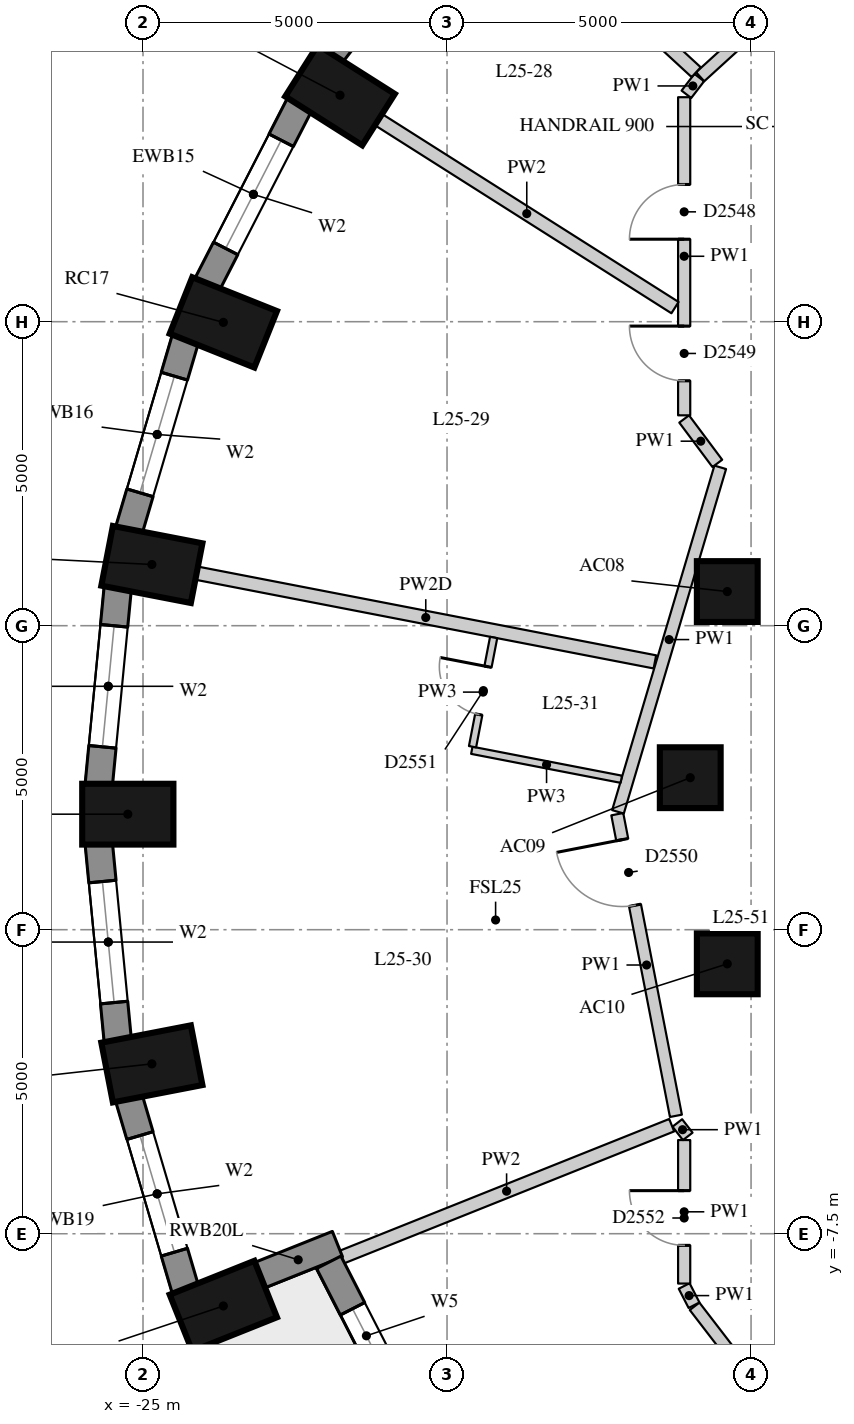
"""IFC4 building model, lengths in metres.
Left out: names, types, materials, properties, quantities, classifications, styles, units other than length and angle.
Written with IfcOpenShell. Run it as: python <this file> out.ifc"""

import sys

from ifc_helpers import new_model, si_unit, direction, frame, frame_2d, origin, origin_2d, place, context, subcontext, project, spatial, rectangle, extrude, element, fill, save


model = new_model("IFC4")
c1 = context("Model", 3, precision=1e-05, world=origin(), true_north=direction((0.0, 1.0)))
c2 = subcontext(c1, "Body", "Model", "MODEL_VIEW")
j1 = project(units=[si_unit("LENGTHUNIT", "METRE"), si_unit("PLANEANGLEUNIT", "RADIAN")], contexts=[c1])
p1 = place(None, origin())
s1 = spatial("IfcSite", under=j1, at=p1, CompositionType="ELEMENT")
p2 = place(p1, origin())
s2 = spatial("IfcBuilding", under=s1, at=p2, CompositionType="ELEMENT")
p3 = place(p2, frame((0.0, 0.0, 92.2)))
s3 = spatial("IfcBuildingStorey", under=s2, at=p3, CompositionType="ELEMENT", Elevation=92.2)
for number, where, z_axis, x_axis in (
    (1, (-21.76, 11.225, 0.0), (0.0, 0.0, 1.0), (-0.845, 0.536, 0.0)),
    (2, (-23.679, 7.489, 0.0), (0.0, 0.0, 1.0), (-0.929, 0.371, 0.0)),
    (3, (-24.854, 3.507, 0.0), (0.0, 0.0, 1.0), (-0.982, 0.19, 0.0)),
    (4, (-25.25, -0.6, 0.0), (0.0, 0.0, 1.0), (-1.0, 0.0, 0.0)),
    (5, (-24.854, -4.707, 0.0), (0.0, 0.0, 1.0), (-0.982, -0.19, 0.0)),
    (6, (-23.679, -8.689, 0.0), (0.0, 0.0, 1.0), (-0.929, -0.371, 0.0)),
):
    element("IfcColumn", number, at=place(p3, frame(where, z_axis=z_axis, x_axis=x_axis)), inside=s3, PredefinedType="COLUMN", context=c2, shape_type="SweptSolid", body=[
        extrude(rectangle(XDim=1.5, YDim=1.0, at=origin_2d()), origin(), (0.0, 0.0, 1.0), 3.3),
    ])
for number, where, z_axis, x_axis in (
    (7, (-15.391, 3.062, 0.0), (0.0, 0.0, 1.0), (1.0, 0.0, 0.0)),
    (8, (-16.0, 0.0, 0.0), (0.0, 0.0, 1.0), (1.0, 0.0, 0.0)),
    (9, (-15.391, -3.062, 0.0), (0.0, 0.0, 1.0), (1.0, 0.0, 0.0)),
):
    element("IfcColumn", number, at=place(p3, frame(where, z_axis=z_axis, x_axis=x_axis)), inside=s3, PredefinedType="COLUMN", context=c2, shape_type="SweptSolid", body=[
        extrude(rectangle(XDim=1.0, YDim=1.0, at=origin_2d()), origin(), (0.0, 0.0, 1.0), 3.3),
    ])
p4 = place(p3, frame((-19.835, 14.575, 0.0), z_axis=(0.0, 0.0, 1.0), x_axis=(-0.610693945156, -0.791866721961, 0.0)))
e10 = element("IfcWall", 10, at=p4, inside=s3, PredefinedType="SOLIDWALL", context=c2, shape_type="SweptSolid", body=[
    extrude(rectangle(XDim=3.395, YDim=0.45, at=frame_2d((1.697, 0.0))), origin(), (0.0, 0.0, 1.0), 3.02),
])
p5 = place(p4, frame((0.697, 0.0, 0.4)))
e11 = element("IfcOpeningElement", 11, at=p5, cuts=e10, PredefinedType="OPENING", context=c2, shape_type="SweptSolid", body=[
    extrude(rectangle(XDim=2.0, YDim=1.75, at=frame_2d((1.0, 0.875))), frame((0.0, 0.235, 0.0), z_axis=(0.0, -1.0, 0.0), x_axis=(1.0, 0.0, 0.0)), (0.0, 0.0, 1.0), 0.47),
])
p6 = place(p3, frame((-22.423, 11.077, 0.0), z_axis=(0.0, 0.0, 1.0), x_axis=(-0.456828186229, -0.889554949549, 0.0)))
e12 = element("IfcWall", 12, at=p6, inside=s3, PredefinedType="SOLIDWALL", context=c2, shape_type="SweptSolid", body=[
    extrude(rectangle(XDim=3.333, YDim=0.45, at=frame_2d((1.667, 0.0))), origin(), (0.0, 0.0, 1.0), 3.02),
])
p7 = place(p6, frame((0.666, 0.0, 0.4)))
e13 = element("IfcOpeningElement", 13, at=p7, cuts=e12, PredefinedType="OPENING", context=c2, shape_type="SweptSolid", body=[
    extrude(rectangle(XDim=2.0, YDim=1.75, at=frame_2d((1.0, 0.875))), frame((0.0, 0.235, 0.0), z_axis=(0.0, -1.0, 0.0), x_axis=(1.0, 0.0, 0.0)), (0.0, 0.0, 1.0), 0.47),
])
p8 = place(p3, frame((-24.302, 7.221, 0.0), z_axis=(0.0, 0.0, 1.0), x_axis=(-0.283071248438, -0.959098883488, 0.0)))
e14 = element("IfcWall", 14, at=p8, inside=s3, PredefinedType="SOLIDWALL", context=c2, shape_type="SweptSolid", body=[
    extrude(rectangle(XDim=3.286, YDim=0.45, at=frame_2d((1.643, 0.0))), origin(), (0.0, 0.0, 1.0), 3.02),
])
p9 = place(p8, frame((0.643, 0.0, 0.4)))
e15 = element("IfcOpeningElement", 15, at=p9, cuts=e14, PredefinedType="OPENING", context=c2, shape_type="SweptSolid", body=[
    extrude(rectangle(XDim=2.0, YDim=1.75, at=frame_2d((1.0, 0.875))), frame((0.0, 0.235, 0.0), z_axis=(0.0, -1.0, 0.0), x_axis=(1.0, 0.0, 0.0)), (0.0, 0.0, 1.0), 0.47),
])
p10 = place(p3, frame((-25.415, 3.126, 0.0), z_axis=(0.0, 0.0, 1.0), x_axis=(-0.095967726544, -0.995384446062, 0.0)))
e16 = element("IfcWall", 16, at=p10, inside=s3, PredefinedType="SOLIDWALL", context=c2, shape_type="SweptSolid", body=[
    extrude(rectangle(XDim=3.261, YDim=0.45, at=frame_2d((1.631, 0.0))), origin(), (0.0, 0.0, 1.0), 3.02),
])
p11 = place(p10, frame((0.631, 0.0, 0.4)))
e17 = element("IfcOpeningElement", 17, at=p11, cuts=e16, PredefinedType="OPENING", context=c2, shape_type="SweptSolid", body=[
    extrude(rectangle(XDim=2.0, YDim=1.75, at=frame_2d((1.0, 0.875))), frame((0.0, 0.235, 0.0), z_axis=(0.0, -1.0, 0.0), x_axis=(1.0, 0.0, 0.0)), (0.0, 0.0, 1.0), 0.47),
])
p12 = place(p3, frame((-25.728, -1.08, 0.0), z_axis=(0.0, 0.0, 1.0), x_axis=(0.095967726544, -0.995384446062, 0.0)))
e18 = element("IfcWall", 18, at=p12, inside=s3, PredefinedType="SOLIDWALL", context=c2, shape_type="SweptSolid", body=[
    extrude(rectangle(XDim=3.261, YDim=0.45, at=frame_2d((1.631, 0.0))), origin(), (0.0, 0.0, 1.0), 3.02),
])
p13 = place(p12, frame((0.631, 0.0, 0.4)))
e19 = element("IfcOpeningElement", 19, at=p13, cuts=e18, PredefinedType="OPENING", context=c2, shape_type="SweptSolid", body=[
    extrude(rectangle(XDim=2.0, YDim=1.75, at=frame_2d((1.0, 0.875))), frame((0.0, 0.235, 0.0), z_axis=(0.0, -1.0, 0.0), x_axis=(1.0, 0.0, 0.0)), (0.0, 0.0, 1.0), 0.47),
])
p14 = place(p3, frame((-25.232, -5.269, 0.0), z_axis=(0.0, 0.0, 1.0), x_axis=(0.283051078697, -0.959104836214, 0.0)))
e20 = element("IfcWall", 20, at=p14, inside=s3, PredefinedType="SOLIDWALL", context=c2, shape_type="SweptSolid", body=[
    extrude(rectangle(XDim=3.286, YDim=0.45, at=frame_2d((1.643, 0.0))), origin(), (0.0, 0.0, 1.0), 3.02),
])
p15 = place(p14, frame((0.643, 0.0, 0.4)))
e21 = element("IfcOpeningElement", 21, at=p15, cuts=e20, PredefinedType="OPENING", context=c2, shape_type="SweptSolid", body=[
    extrude(rectangle(XDim=2.0, YDim=1.75, at=frame_2d((1.0, 0.875))), frame((0.0, 0.235, 0.0), z_axis=(0.0, -1.0, 0.0), x_axis=(1.0, 0.0, 0.0)), (0.0, 0.0, 1.0), 0.47),
])
p16 = place(p3, frame((-23.093, -8.187, 0.0), z_axis=(0.0, 0.0, 1.0), x_axis=(0.928549333349, 0.371209018665, 0.0)))
e22 = element("IfcWall", 22, at=p16, inside=s3, PredefinedType="SOLIDWALL", context=c2, shape_type="SweptSolid", body=[
    extrude(rectangle(XDim=1.39, YDim=0.45, at=frame_2d((0.695, 0.0))), origin(), (0.0, 0.0, 1.0), 3.02),
])
p17 = place(p3, frame((-21.945, -7.97, 0.0), z_axis=(0.0, 0.0, 1.0), x_axis=(0.455905146579, -0.89002836883, 0.0)))
e23 = element("IfcWall", 23, at=p17, inside=s3, PredefinedType="SOLIDWALL", context=c2, shape_type="SweptSolid", body=[
    extrude(rectangle(XDim=3.867, YDim=0.45, at=frame_2d((1.934, 0.0))), origin(), (0.0, 0.0, 1.0), 3.02),
])
p18 = place(p17, frame((0.858, 0.0, 0.4)))
e24 = element("IfcOpeningElement", 24, at=p18, cuts=e23, PredefinedType="OPENING", context=c2, shape_type="SweptSolid", body=[
    extrude(rectangle(XDim=1.0, YDim=1.75, at=frame_2d((0.5, 0.875))), frame((0.0, 0.235, 0.0), z_axis=(0.0, -1.0, 0.0), x_axis=(1.0, 0.0, 0.0)), (0.0, 0.0, 1.0), 0.47),
])
p19 = place(p17, frame((2.009, 0.0, 0.0)))
e25 = element("IfcOpeningElement", 25, at=p19, cuts=e23, PredefinedType="OPENING", context=c2, shape_type="SweptSolid", body=[
    extrude(rectangle(XDim=1.0, YDim=2.15, at=frame_2d((0.5, 1.075))), frame((0.0, 0.235, 0.0), z_axis=(0.0, -1.0, 0.0), x_axis=(1.0, 0.0, 0.0)), (0.0, 0.0, 1.0), 0.47),
])
p20 = place(p3, frame((-14.573, -10.456, 0.0), z_axis=(0.0, 0.0, 1.0), x_axis=(-0.60967360535, 0.792652568872, 0.0)))
e26 = element("IfcWall", 26, at=p20, inside=s3, PredefinedType="PARTITIONING", context=c2, shape_type="SweptSolid", body=[
    extrude(rectangle(XDim=2.223, YDim=0.2, at=frame_2d((1.111, 0.0))), origin(), (0.0, 0.0, 1.0), 3.02),
])
p21 = place(p3, frame((-15.938, -8.676, 0.0), z_axis=(0.0, 0.0, 1.0), x_axis=(-0.456525695549, 0.889710227717, 0.0)))
e27 = element("IfcWall", 27, at=p21, inside=s3, PredefinedType="PARTITIONING", context=c2, shape_type="SweptSolid", body=[
    extrude(rectangle(XDim=0.356, YDim=0.2, at=frame_2d((0.178, 0.0))), origin(), (0.0, 0.0, 1.0), 3.02),
])
p22 = place(p3, frame((-16.1, -8.32, 0.0), z_axis=(0.0, 0.0, 1.0), x_axis=(0.0, 1.0, 0.0)))
e28 = element("IfcWall", 28, at=p22, inside=s3, PredefinedType="PARTITIONING", context=c2, shape_type="SweptSolid", body=[
    extrude(rectangle(XDim=2.36, YDim=0.2, at=frame_2d((1.18, 0.0))), origin(), (0.0, 0.0, 1.0), 3.02),
])
p23 = place(p22, frame((0.628, 0.0, 0.0)))
e29 = element("IfcOpeningElement", 29, at=p23, cuts=e28, PredefinedType="OPENING", context=c2, shape_type="SweptSolid", body=[
    extrude(rectangle(XDim=0.9, YDim=2.1, at=frame_2d((0.45, 1.05))), frame((0.0, 0.11, 0.0), z_axis=(0.0, -1.0, 0.0), x_axis=(1.0, 0.0, 0.0)), (0.0, 0.0, 1.0), 0.22),
])
p24 = place(p3, frame((-16.041, -5.9, 0.0), z_axis=(0.0, 0.0, 1.0), x_axis=(-0.612489897904, 0.790478415243, 0.0)))
e30 = element("IfcWall", 30, at=p24, inside=s3, PredefinedType="PARTITIONING", context=c2, shape_type="SweptSolid", body=[
    extrude(rectangle(XDim=0.28, YDim=0.2, at=frame_2d((0.14, 0.0))), origin(), (0.0, 0.0, 1.0), 3.02),
])
p25 = place(p3, frame((-16.236, -5.562, 0.0), z_axis=(0.0, 0.0, 1.0), x_axis=(-0.190753296708, 0.981638008532, 0.0)))
e31 = element("IfcWall", 31, at=p25, inside=s3, PredefinedType="PARTITIONING", context=c2, shape_type="SweptSolid", body=[
    extrude(rectangle(XDim=5.054, YDim=0.2, at=frame_2d((2.527, 0.0))), origin(), (0.0, 0.0, 1.0), 3.02),
])
p26 = place(p25, frame((3.528, 0.0, 0.0)))
e32 = element("IfcOpeningElement", 32, at=p26, cuts=e31, PredefinedType="OPENING", context=c2, shape_type="SweptSolid", body=[
    extrude(rectangle(XDim=1.1, YDim=2.1, at=frame_2d((0.55, 1.05))), frame((0.0, 0.11, 0.0), z_axis=(0.0, -1.0, 0.0), x_axis=(1.0, 0.0, 0.0)), (0.0, 0.0, 1.0), 0.22),
])
p27 = place(p3, frame((-17.189, -0.562, 0.0), z_axis=(0.0, 0.0, 1.0), x_axis=(0.28454253649, 0.95866341587, 0.0)))
e33 = element("IfcWall", 33, at=p27, inside=s3, PredefinedType="PARTITIONING", context=c2, shape_type="SweptSolid", body=[
    extrude(rectangle(XDim=5.911, YDim=0.2, at=frame_2d((2.956, 0.0))), origin(), (0.0, 0.0, 1.0), 3.02),
])
p28 = place(p3, frame((-15.555, 5.169, 0.0), z_axis=(0.0, 0.0, 1.0), x_axis=(-0.598284647233, 0.801283645712, 0.0)))
e34 = element("IfcWall", 34, at=p28, inside=s3, PredefinedType="PARTITIONING", context=c2, shape_type="SweptSolid", body=[
    extrude(rectangle(XDim=0.912, YDim=0.2, at=frame_2d((0.456, 0.0))), origin(), (0.0, 0.0, 1.0), 3.02),
])
p29 = place(p3, frame((-16.1, 5.96, 0.0), z_axis=(0.0, 0.0, 1.0), x_axis=(0.0, 1.0, 0.0)))
e35 = element("IfcWall", 35, at=p29, inside=s3, PredefinedType="PARTITIONING", context=c2, shape_type="SweptSolid", body=[
    extrude(rectangle(XDim=5.232, YDim=0.2, at=frame_2d((2.616, 0.0))), origin(), (0.0, 0.0, 1.0), 3.02),
])
p30 = place(p29, frame((2.897, 0.0, 0.0)))
e36 = element("IfcOpeningElement", 36, at=p30, cuts=e35, PredefinedType="OPENING", context=c2, shape_type="SweptSolid", body=[
    extrude(rectangle(XDim=0.9, YDim=2.1, at=frame_2d((0.45, 1.05))), frame((0.0, 0.11, 0.0), z_axis=(0.0, -1.0, 0.0), x_axis=(1.0, 0.0, 0.0)), (0.0, 0.0, 1.0), 0.22),
])
p31 = place(p29, frame((0.568, 0.0, 0.0)))
e37 = element("IfcOpeningElement", 37, at=p31, cuts=e35, PredefinedType="OPENING", context=c2, shape_type="SweptSolid", body=[
    extrude(rectangle(XDim=0.9, YDim=2.1, at=frame_2d((0.45, 1.05))), frame((0.0, 0.11, 0.0), z_axis=(0.0, -1.0, 0.0), x_axis=(1.0, 0.0, 0.0)), (0.0, 0.0, 1.0), 0.22),
])
p32 = place(p3, frame((-16.063, 11.24, 0.0), z_axis=(0.0, 0.0, 1.0), x_axis=(0.609744747854, 0.792597844096, 0.0)))
e38 = element("IfcWall", 38, at=p32, inside=s3, PredefinedType="PARTITIONING", context=c2, shape_type="SweptSolid", body=[
    extrude(rectangle(XDim=0.347, YDim=0.2, at=frame_2d((0.174, 0.0))), origin(), (0.0, 0.0, 1.0), 3.02),
])
p33 = place(p3, frame((-15.837, 11.528, 0.0), z_axis=(0.0, 0.0, 1.0), x_axis=(0.739402681643, 0.673263450946, 0.0)))
e39 = element("IfcWall", 39, at=p33, inside=s3, PredefinedType="PARTITIONING", context=c2, shape_type="SweptSolid", body=[
    extrude(rectangle(XDim=1.728, YDim=0.2, at=frame_2d((0.864, 0.0))), origin(), (0.0, 0.0, 1.0), 3.02),
])
p34 = place(p3, frame((-18.604, 14.094, 0.0), z_axis=(0.0, 0.0, 1.0), x_axis=(0.73529495628, -0.677747244383, 0.0)))
e40 = element("IfcWall", 40, at=p34, inside=s3, PredefinedType="PARTITIONING", context=c2, shape_type="SweptSolid", body=[
    extrude(rectangle(XDim=3.674, YDim=0.22, at=frame_2d((1.837, 0.0))), origin(), (0.0, 0.0, 1.0), 3.02),
])
p35 = place(p3, frame((-21.126, 10.823, 0.0), z_axis=(0.0, 0.0, 1.0), x_axis=(0.844518840625, -0.535525842355, 0.0)))
e41 = element("IfcWall", 41, at=p35, inside=s3, PredefinedType="PARTITIONING", context=c2, shape_type="SweptSolid", body=[
    extrude(rectangle(XDim=5.773, YDim=0.22, at=frame_2d((2.887, 0.0))), origin(), (0.0, 0.0, 1.0), 3.02),
])
p36 = place(p3, frame((-24.118, 3.364, 0.0), z_axis=(0.0, 0.0, 1.0), x_axis=(0.981759939745, -0.19012475039, 0.0)))
e42 = element("IfcWall", 42, at=p36, inside=s3, PredefinedType="PARTITIONING", context=c2, shape_type="SweptSolid", body=[
    extrude(rectangle(XDim=7.677, YDim=0.22, at=frame_2d((3.838, 0.0))), origin(), (0.0, 0.0, 1.0), 2.47),
])
p37 = place(p3, frame((-21.736, -7.887, 0.0), z_axis=(0.0, 0.0, 1.0), x_axis=(0.928522746632, 0.371275516277, 0.0)))
e43 = element("IfcWall", 43, at=p37, inside=s3, PredefinedType="PARTITIONING", context=c2, shape_type="SweptSolid", body=[
    extrude(rectangle(XDim=5.848, YDim=0.22, at=frame_2d((2.924, 0.0))), origin(), (0.0, 0.0, 1.0), 3.02),
])
p38 = place(p3, frame((-17.134, -0.026, 0.0), z_axis=(0.0, 0.0, 1.0), x_axis=(-0.98174757037, 0.190188611835, 0.0)))
e44 = element("IfcWall", 44, at=p38, inside=s3, PredefinedType="PARTITIONING", context=c2, shape_type="SweptSolid", body=[
    extrude(rectangle(XDim=2.504, YDim=0.12, at=frame_2d((1.252, 0.0))), origin(), (0.0, 0.0, 1.0), 3.02),
])
p39 = place(p3, frame((-19.581, 0.509, 0.0), z_axis=(0.0, 0.0, 1.0), x_axis=(0.189826955452, 0.981817562984, 0.0)))
e45 = element("IfcWall", 45, at=p39, inside=s3, PredefinedType="PARTITIONING", context=c2, shape_type="SweptSolid", body=[
    extrude(rectangle(XDim=1.83, YDim=0.12, at=frame_2d((0.915, 0.0))), origin(), (0.0, 0.0, 1.0), 3.02),
])
p40 = place(p39, frame((0.54, 0.0, 0.0)))
e46 = element("IfcOpeningElement", 46, at=p40, cuts=e45, PredefinedType="OPENING", context=c2, shape_type="SweptSolid", body=[
    extrude(rectangle(XDim=0.8, YDim=2.1, at=frame_2d((0.4, 1.05))), frame((0.0, 0.07, 0.0), z_axis=(0.0, -1.0, 0.0), x_axis=(1.0, 0.0, 0.0)), (0.0, 0.0, 1.0), 0.14),
])
p41 = place(p7, origin())
e47 = element("IfcWindow", 47, at=p41, inside=s3, PartitioningType="SINGLE_PANEL", PredefinedType="WINDOW", context=c2, shape_type="SweptSolid", body=[
    extrude(rectangle(XDim=2.0, YDim=1.75, at=frame_2d((1.0, 0.875))), frame((0.0, 0.035, 0.0), z_axis=(0.0, -1.0, 0.0), x_axis=(1.0, 0.0, 0.0)), (0.0, 0.0, 1.0), 0.06),
])
fill(e13, e47)
p42 = place(p9, origin())
e48 = element("IfcWindow", 48, at=p42, inside=s3, PartitioningType="SINGLE_PANEL", PredefinedType="WINDOW", context=c2, shape_type="SweptSolid", body=[
    extrude(rectangle(XDim=2.0, YDim=1.75, at=frame_2d((1.0, 0.875))), frame((0.0, 0.035, 0.0), z_axis=(0.0, -1.0, 0.0), x_axis=(1.0, 0.0, 0.0)), (0.0, 0.0, 1.0), 0.06),
])
fill(e15, e48)
p43 = place(p11, origin())
e49 = element("IfcWindow", 49, at=p43, inside=s3, PartitioningType="SINGLE_PANEL", PredefinedType="WINDOW", context=c2, shape_type="SweptSolid", body=[
    extrude(rectangle(XDim=2.0, YDim=1.75, at=frame_2d((1.0, 0.875))), frame((0.0, 0.035, 0.0), z_axis=(0.0, -1.0, 0.0), x_axis=(1.0, 0.0, 0.0)), (0.0, 0.0, 1.0), 0.06),
])
fill(e17, e49)
p44 = place(p13, origin())
e50 = element("IfcWindow", 50, at=p44, inside=s3, PartitioningType="SINGLE_PANEL", PredefinedType="WINDOW", context=c2, shape_type="SweptSolid", body=[
    extrude(rectangle(XDim=2.0, YDim=1.75, at=frame_2d((1.0, 0.875))), frame((0.0, 0.035, 0.0), z_axis=(0.0, -1.0, 0.0), x_axis=(1.0, 0.0, 0.0)), (0.0, 0.0, 1.0), 0.06),
])
fill(e19, e50)
p45 = place(p15, origin())
e51 = element("IfcWindow", 51, at=p45, inside=s3, PartitioningType="SINGLE_PANEL", PredefinedType="WINDOW", context=c2, shape_type="SweptSolid", body=[
    extrude(rectangle(XDim=2.0, YDim=1.75, at=frame_2d((1.0, 0.875))), frame((0.0, 0.035, 0.0), z_axis=(0.0, -1.0, 0.0), x_axis=(1.0, 0.0, 0.0)), (0.0, 0.0, 1.0), 0.06),
])
fill(e21, e51)
p46 = place(p18, origin())
e52 = element("IfcWindow", 52, at=p46, inside=s3, PartitioningType="SINGLE_PANEL", PredefinedType="WINDOW", context=c2, shape_type="SweptSolid", body=[
    extrude(rectangle(XDim=1.0, YDim=1.75, at=frame_2d((0.5, 0.875))), frame((0.0, 0.035, 0.0), z_axis=(0.0, -1.0, 0.0), x_axis=(1.0, 0.0, 0.0)), (0.0, 0.0, 1.0), 0.06),
])
fill(e24, e52)
p47 = place(p30, origin())
e53 = element("IfcDoor", 53, at=p47, inside=s3, OperationType="SINGLE_SWING_LEFT", PredefinedType="DOOR", context=c2, shape_type="SweptSolid", body=[
    extrude(rectangle(XDim=0.9, YDim=2.1, at=frame_2d((0.45, 1.05))), frame((0.0, 0.025, 0.0), z_axis=(0.0, -1.0, 0.0), x_axis=(1.0, 0.0, 0.0)), (0.0, 0.0, 1.0), 0.05),
])
fill(e36, e53)
p48 = place(p31, origin())
e54 = element("IfcDoor", 54, at=p48, inside=s3, OperationType="SINGLE_SWING_RIGHT", PredefinedType="DOOR", context=c2, shape_type="SweptSolid", body=[
    extrude(rectangle(XDim=0.9, YDim=2.1, at=frame_2d((0.45, 1.05))), frame((0.0, 0.025, 0.0), z_axis=(0.0, -1.0, 0.0), x_axis=(1.0, 0.0, 0.0)), (0.0, 0.0, 1.0), 0.05),
])
fill(e37, e54)
p49 = place(p26, origin())
e55 = element("IfcDoor", 55, at=p49, inside=s3, OperationType="SINGLE_SWING_RIGHT", PredefinedType="DOOR", context=c2, shape_type="SweptSolid", body=[
    extrude(rectangle(XDim=1.1, YDim=2.1, at=frame_2d((0.55, 1.05))), frame((0.0, 0.025, 0.0), z_axis=(0.0, -1.0, 0.0), x_axis=(1.0, 0.0, 0.0)), (0.0, 0.0, 1.0), 0.05),
])
fill(e32, e55)
p50 = place(p40, origin())
e56 = element("IfcDoor", 56, at=p50, inside=s3, OperationType="SINGLE_SWING_RIGHT", PredefinedType="DOOR", context=c2, shape_type="SweptSolid", body=[
    extrude(rectangle(XDim=0.8, YDim=2.1, at=frame_2d((0.4, 1.05))), frame((0.0, 0.025, 0.0), z_axis=(0.0, -1.0, 0.0), x_axis=(1.0, 0.0, 0.0)), (0.0, 0.0, 1.0), 0.05),
])
fill(e46, e56)
p51 = place(p23, origin())
e57 = element("IfcDoor", 57, at=p51, inside=s3, OperationType="SINGLE_SWING_RIGHT", PredefinedType="DOOR", context=c2, shape_type="SweptSolid", body=[
    extrude(rectangle(XDim=0.9, YDim=2.1, at=frame_2d((0.45, 1.05))), frame((0.0, 0.025, 0.0), z_axis=(0.0, -1.0, 0.0), x_axis=(1.0, 0.0, 0.0)), (0.0, 0.0, 1.0), 0.05),
])
fill(e29, e57)
save(model, sys.argv[1])
